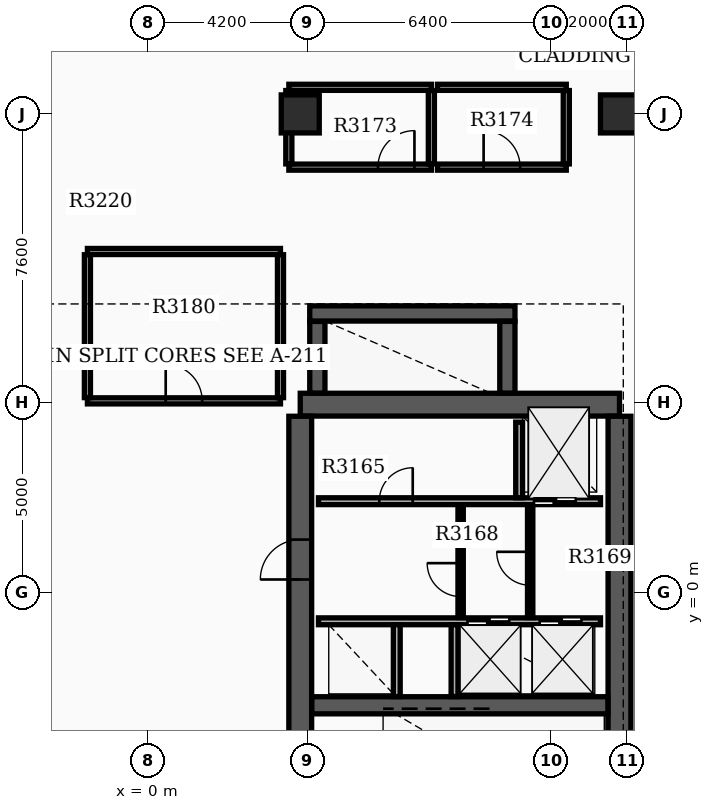
"""IFC4 building model, lengths in metres.
Left out: names, types, materials, properties, quantities, classifications, styles, units other than length and angle.
Written with IfcOpenShell. Run it as: python <this file> out.ifc"""

import sys

from ifc_helpers import new_model, si_unit, direction, frame, frame_2d, origin, origin_2d, place, context, subcontext, project, spatial, rectangle, extrude, element, fill, save


model = new_model("IFC4")
c1 = context("Model", 3, precision=1e-05, world=origin(), true_north=direction((0.0, 1.0)))
c2 = subcontext(c1, "Body", "Model", "MODEL_VIEW")
j1 = project(units=[si_unit("LENGTHUNIT", "METRE"), si_unit("PLANEANGLEUNIT", "RADIAN")], contexts=[c1])
p1 = place(None, origin())
s1 = spatial("IfcSite", under=j1, at=p1, CompositionType="ELEMENT")
p2 = place(p1, origin())
s2 = spatial("IfcBuilding", under=s1, at=p2, CompositionType="ELEMENT")
p3 = place(p2, frame((0.0, 0.0, 201.3)))
s3 = spatial("IfcBuildingStorey", under=s2, at=p3, CompositionType="ELEMENT", Elevation=201.3)
p4 = place(p3, frame((4.0, 4.95, 0.0), z_axis=(0.0, 0.0, 1.0), x_axis=(1.0, 0.0, 0.0)))
e1 = element("IfcWall", 1, at=p4, inside=s3, PredefinedType="SHEAR", context=c2, shape_type="SweptSolid", body=[
    extrude(rectangle(XDim=8.4, YDim=0.6, at=frame_2d((4.2, 0.0))), origin(), (0.0, 0.0, 1.0), 3.7),
])
p5 = place(p3, frame((4.0, -6.545, 0.0), z_axis=(0.0, 0.0, 1.0), x_axis=(0.0, 1.0, 0.0)))
e2 = element("IfcWall", 2, at=p5, inside=s3, PredefinedType="SHEAR", context=c2, shape_type="SweptSolid", body=[
    extrude(rectangle(XDim=11.19, YDim=0.6, at=frame_2d((5.595, 0.0))), origin(), (0.0, 0.0, 1.0), 3.7),
])
p6 = place(p5, frame((1.295, 0.0, 0.0)))
e3 = element("IfcOpeningElement", 3, at=p6, cuts=e2, PredefinedType="OPENING", context=c2, shape_type="SweptSolid", body=[
    extrude(rectangle(XDim=1.05, YDim=2.15, at=frame_2d((0.525, 1.075))), frame((0.0, 0.31, 0.0), z_axis=(0.0, -1.0, 0.0), x_axis=(1.0, 0.0, 0.0)), (0.0, 0.0, 1.0), 0.62),
])
p7 = place(p5, frame((6.895, 0.0, 0.0)))
e4 = element("IfcOpeningElement", 4, at=p7, cuts=e2, PredefinedType="OPENING", context=c2, shape_type="SweptSolid", body=[
    extrude(rectangle(XDim=1.05, YDim=2.15, at=frame_2d((0.525, 1.075))), frame((0.0, 0.31, 0.0), z_axis=(0.0, -1.0, 0.0), x_axis=(1.0, 0.0, 0.0)), (0.0, 0.0, 1.0), 0.62),
])
p8 = place(p3, frame((12.4, -6.545, 0.0), z_axis=(0.0, 0.0, 1.0), x_axis=(0.0, 1.0, 0.0)))
e5 = element("IfcWall", 5, at=p8, inside=s3, PredefinedType="SHEAR", context=c2, shape_type="SweptSolid", body=[
    extrude(rectangle(XDim=11.19, YDim=0.6, at=frame_2d((5.595, 0.0))), origin(), (0.0, 0.0, 1.0), 3.7),
])
p9 = place(p3, frame((4.305, -2.96, 0.0), z_axis=(0.0, 0.0, 1.0), x_axis=(1.0, 0.0, 0.0)))
e6 = element("IfcWall", 6, at=p9, inside=s3, PredefinedType="SHEAR", context=c2, shape_type="SweptSolid", body=[
    extrude(rectangle(XDim=7.79, YDim=0.45, at=frame_2d((3.895, 0.0))), origin(), (0.0, 0.0, 1.0), 3.7),
])
p10 = place(p3, frame((4.45, 5.255, 0.0), z_axis=(0.0, 0.0, 1.0), x_axis=(0.0, 1.0, 0.0)))
e7 = element("IfcWall", 7, at=p10, inside=s3, PredefinedType="SHEAR", context=c2, shape_type="SweptSolid", body=[
    extrude(rectangle(XDim=1.885, YDim=0.4, at=frame_2d((0.942, 0.0))), origin(), (0.0, 0.0, 1.0), 3.7),
])
p11 = place(p3, frame((4.25, 7.35, 0.0), z_axis=(0.0, 0.0, 1.0), x_axis=(1.0, 0.0, 0.0)))
e8 = element("IfcWall", 8, at=p11, inside=s3, PredefinedType="SHEAR", context=c2, shape_type="SweptSolid", body=[
    extrude(rectangle(XDim=5.4, YDim=0.4, at=frame_2d((2.7, 0.0))), origin(), (0.0, 0.0, 1.0), 3.7),
])
p12 = place(p3, frame((9.45, 5.255, 0.0), z_axis=(0.0, 0.0, 1.0), x_axis=(0.0, 1.0, 0.0)))
e9 = element("IfcWall", 9, at=p12, inside=s3, PredefinedType="SHEAR", context=c2, shape_type="SweptSolid", body=[
    extrude(rectangle(XDim=1.885, YDim=0.4, at=frame_2d((0.942, 0.0))), origin(), (0.0, 0.0, 1.0), 3.7),
])
for number, where, z_axis, x_axis in (
    (10, (12.4, 12.6, 0.0), (0.0, 0.0, 1.0), (1.0, 0.0, 0.0)),
    (11, (4.0, 12.6, 0.0), (0.0, 0.0, 1.0), (1.0, 0.0, 0.0)),
):
    element("IfcColumn", number, at=place(p3, frame(where, z_axis=z_axis, x_axis=x_axis)), inside=s3, PredefinedType="COLUMN", context=c2, shape_type="SweptSolid", body=[
        extrude(rectangle(XDim=1.0, YDim=1.0, at=origin_2d()), origin(), (0.0, 0.0, 1.0), 3.9),
    ])
p13 = place(p3, frame((13.796, 14.194, 0.0), z_axis=(0.0, 0.0, 1.0), x_axis=(-0.998023660242, -0.06283926796, 0.0)))
e12 = element("IfcWall", 12, at=p13, inside=s3, PredefinedType="STANDARD", context=c2, shape_type="SweptSolid", body=[
    extrude(rectangle(XDim=1.22, YDim=0.28, at=frame_2d((0.61, 0.0))), origin(), (0.0, 0.0, 1.0), 3.18),
])
p14 = place(p3, frame((4.48, 2.41, 0.0), z_axis=(0.0, 0.0, 1.0), x_axis=(1.0, 0.0, 0.0)))
e13 = element("IfcWall", 13, at=p14, inside=s3, PredefinedType="SOLIDWALL", context=c2, shape_type="SweptSolid", body=[
    extrude(rectangle(XDim=7.42, YDim=0.18, at=frame_2d((3.71, 0.0))), origin(), (0.0, 0.0, 1.0), 3.17),
])
p15 = place(p14, frame((5.67, 0.0, 0.0)))
e14 = element("IfcOpeningElement", 14, at=p15, cuts=e13, PredefinedType="OPENING", context=c2, shape_type="SweptSolid", body=[
    extrude(rectangle(XDim=1.1, YDim=2.15, at=frame_2d((0.55, 1.075))), frame((0.0, 0.1, 0.0), z_axis=(0.0, -1.0, 0.0), x_axis=(1.0, 0.0, 0.0)), (0.0, 0.0, 1.0), 0.2),
])
p16 = place(p14, frame((1.6, 0.0, 0.0)))
e15 = element("IfcOpeningElement", 15, at=p16, cuts=e13, PredefinedType="OPENING", context=c2, shape_type="SweptSolid", body=[
    extrude(rectangle(XDim=0.88, YDim=2.1, at=frame_2d((0.44, 1.05))), frame((0.0, 0.1, 0.0), z_axis=(0.0, -1.0, 0.0), x_axis=(1.0, 0.0, 0.0)), (0.0, 0.0, 1.0), 0.2),
])
p17 = place(p3, frame((4.48, -0.75, 0.0), z_axis=(0.0, 0.0, 1.0), x_axis=(1.0, 0.0, 0.0)))
e16 = element("IfcWall", 16, at=p17, inside=s3, PredefinedType="SOLIDWALL", context=c2, shape_type="SweptSolid", body=[
    extrude(rectangle(XDim=7.42, YDim=0.18, at=frame_2d((3.71, 0.0))), origin(), (0.0, 0.0, 1.0), 3.17),
])
p18 = place(p17, frame((3.92, 0.0, 0.0)))
e17 = element("IfcOpeningElement", 17, at=p18, cuts=e16, PredefinedType="OPENING", context=c2, shape_type="SweptSolid", body=[
    extrude(rectangle(XDim=1.1, YDim=2.15, at=frame_2d((0.55, 1.075))), frame((0.0, 0.1, 0.0), z_axis=(0.0, -1.0, 0.0), x_axis=(1.0, 0.0, 0.0)), (0.0, 0.0, 1.0), 0.2),
])
p19 = place(p17, frame((5.82, 0.0, 0.0)))
e18 = element("IfcOpeningElement", 18, at=p19, cuts=e16, PredefinedType="OPENING", context=c2, shape_type="SweptSolid", body=[
    extrude(rectangle(XDim=1.1, YDim=2.15, at=frame_2d((0.55, 1.075))), frame((0.0, 0.1, 0.0), z_axis=(0.0, -1.0, 0.0), x_axis=(1.0, 0.0, 0.0)), (0.0, 0.0, 1.0), 0.2),
])
p20 = place(p3, frame((9.76, 2.5, 0.0), z_axis=(0.0, 0.0, 1.0), x_axis=(0.0, 1.0, 0.0)))
e19 = element("IfcWall", 19, at=p20, inside=s3, PredefinedType="SOLIDWALL", context=c2, shape_type="SweptSolid", body=[
    extrude(rectangle(XDim=1.99, YDim=0.18, at=frame_2d((0.995, 0.0))), origin(), (0.0, 0.0, 1.0), 3.17),
])
for number, where, z_axis, x_axis in (
    (20, (6.54, -2.73, 0.0), (0.0, 0.0, 1.0), (0.0, 1.0, 0.0)),
    (21, (8.06, -2.73, 0.0), (0.0, 0.0, 1.0), (0.0, 1.0, 0.0)),
):
    element("IfcWall", number, at=place(p3, frame(where, z_axis=z_axis, x_axis=x_axis)), inside=s3, PredefinedType="SOLIDWALL", context=c2, shape_type="SweptSolid", body=[
        extrude(rectangle(XDim=1.89, YDim=0.18, at=frame_2d((0.945, 0.0))), origin(), (0.0, 0.0, 1.0), 3.17),
    ])
p21 = place(p3, frame((8.22, -0.65, 0.0), z_axis=(0.0, 0.0, 1.0), x_axis=(0.0, 1.0, 0.0)))
e22 = element("IfcWall", 22, at=p21, inside=s3, PredefinedType="SOLIDWALL", context=c2, shape_type="SweptSolid", body=[
    extrude(rectangle(XDim=2.96, YDim=0.14, at=frame_2d((1.48, 0.0))), origin(), (0.0, 0.0, 1.0), 3.17),
])
p22 = place(p21, frame((0.55, 0.0, 0.0)))
e23 = element("IfcOpeningElement", 23, at=p22, cuts=e22, PredefinedType="OPENING", context=c2, shape_type="SweptSolid", body=[
    extrude(rectangle(XDim=0.88, YDim=2.1, at=frame_2d((0.44, 1.05))), frame((0.0, 0.08, 0.0), z_axis=(0.0, -1.0, 0.0), x_axis=(1.0, 0.0, 0.0)), (0.0, 0.0, 1.0), 0.16),
])
p23 = place(p3, frame((10.05, -0.652, 0.0), z_axis=(0.0, 0.0, 1.0), x_axis=(0.0, 1.0, 0.0)))
e24 = element("IfcWall", 24, at=p23, inside=s3, PredefinedType="PARTITIONING", context=c2, shape_type="SweptSolid", body=[
    extrude(rectangle(XDim=2.962, YDim=0.14, at=frame_2d((1.481, 0.0))), origin(), (0.0, 0.0, 1.0), 3.17),
])
p24 = place(p23, frame((0.85, 0.0, 0.0)))
e25 = element("IfcOpeningElement", 25, at=p24, cuts=e24, PredefinedType="OPENING", context=c2, shape_type="SweptSolid", body=[
    extrude(rectangle(XDim=0.88, YDim=2.1, at=frame_2d((0.44, 1.05))), frame((0.0, 0.08, 0.0), z_axis=(0.0, -1.0, 0.0), x_axis=(1.0, 0.0, 0.0)), (0.0, 0.0, 1.0), 0.16),
])
p25 = place(p3, frame((3.7, 11.2, 0.0), z_axis=(0.0, 0.0, 1.0), x_axis=(1.0, 0.0, 0.0)))
e26 = element("IfcWall", 26, at=p25, inside=s3, PredefinedType="PARTITIONING", context=c2, shape_type="SweptSolid", body=[
    extrude(rectangle(XDim=3.75, YDim=0.16, at=frame_2d((1.875, 0.0))), origin(), (0.0, 0.0, 1.0), 3.17),
])
p26 = place(p25, frame((2.345, 0.0, 0.0)))
e27 = element("IfcOpeningElement", 27, at=p26, cuts=e26, PredefinedType="OPENING", context=c2, shape_type="SweptSolid", body=[
    extrude(rectangle(XDim=0.96, YDim=2.15, at=frame_2d((0.48, 1.075))), frame((0.0, 0.09, 0.0), z_axis=(0.0, -1.0, 0.0), x_axis=(1.0, 0.0, 0.0)), (0.0, 0.0, 1.0), 0.18),
])
p27 = place(p3, frame((3.7, 13.3, 0.0), z_axis=(0.0, 0.0, 1.0), x_axis=(1.0, 0.0, 0.0)))
e28 = element("IfcWall", 28, at=p27, inside=s3, PredefinedType="PARTITIONING", context=c2, shape_type="SweptSolid", body=[
    extrude(rectangle(XDim=3.75, YDim=0.16, at=frame_2d((1.875, 0.0))), origin(), (0.0, 0.0, 1.0), 3.17),
])
for number, where, z_axis, x_axis in (
    (29, (3.7, 11.285, 0.0), (0.0, 0.0, 1.0), (0.0, 1.0, 0.0)),
    (30, (7.45, 11.285, 0.0), (0.0, 0.0, 1.0), (0.0, 1.0, 0.0)),
):
    element("IfcWall", number, at=place(p3, frame(where, z_axis=z_axis, x_axis=x_axis)), inside=s3, PredefinedType="PARTITIONING", context=c2, shape_type="SweptSolid", body=[
        extrude(rectangle(XDim=1.93, YDim=0.16, at=frame_2d((0.965, 0.0))), origin(), (0.0, 0.0, 1.0), 3.17),
    ])
p28 = place(p3, frame((7.61, 11.2, 0.0), z_axis=(0.0, 0.0, 1.0), x_axis=(1.0, 0.0, 0.0)))
e31 = element("IfcWall", 31, at=p28, inside=s3, PredefinedType="PARTITIONING", context=c2, shape_type="SweptSolid", body=[
    extrude(rectangle(XDim=3.39, YDim=0.16, at=frame_2d((1.695, 0.0))), origin(), (0.0, 0.0, 1.0), 3.17),
])
p29 = place(p28, frame((1.215, 0.0, 0.0)))
e32 = element("IfcOpeningElement", 32, at=p29, cuts=e31, PredefinedType="OPENING", context=c2, shape_type="SweptSolid", body=[
    extrude(rectangle(XDim=0.96, YDim=2.15, at=frame_2d((0.48, 1.075))), frame((0.0, 0.09, 0.0), z_axis=(0.0, -1.0, 0.0), x_axis=(1.0, 0.0, 0.0)), (0.0, 0.0, 1.0), 0.18),
])
p30 = place(p3, frame((7.61, 13.3, 0.0), z_axis=(0.0, 0.0, 1.0), x_axis=(1.0, 0.0, 0.0)))
e33 = element("IfcWall", 33, at=p30, inside=s3, PredefinedType="PARTITIONING", context=c2, shape_type="SweptSolid", body=[
    extrude(rectangle(XDim=3.39, YDim=0.16, at=frame_2d((1.695, 0.0))), origin(), (0.0, 0.0, 1.0), 3.17),
])
p31 = place(p3, frame((11.0, 11.285, 0.0), z_axis=(0.0, 0.0, 1.0), x_axis=(0.0, 1.0, 0.0)))
e34 = element("IfcWall", 34, at=p31, inside=s3, PredefinedType="PARTITIONING", context=c2, shape_type="SweptSolid", body=[
    extrude(rectangle(XDim=1.93, YDim=0.16, at=frame_2d((0.965, 0.0))), origin(), (0.0, 0.0, 1.0), 3.17),
])
p32 = place(p3, frame((-1.6, 5.05, 0.0), z_axis=(0.0, 0.0, 1.0), x_axis=(1.0, 0.0, 0.0)))
e35 = element("IfcWall", 35, at=p32, inside=s3, PredefinedType="PARTITIONING", context=c2, shape_type="SweptSolid", body=[
    extrude(rectangle(XDim=5.08, YDim=0.16, at=frame_2d((2.54, 0.0))), origin(), (0.0, 0.0, 1.0), 3.17),
])
p33 = place(p32, frame((2.06, 0.0, 0.0)))
e36 = element("IfcOpeningElement", 36, at=p33, cuts=e35, PredefinedType="OPENING", context=c2, shape_type="SweptSolid", body=[
    extrude(rectangle(XDim=0.96, YDim=2.15, at=frame_2d((0.48, 1.075))), frame((0.0, 0.09, 0.0), z_axis=(0.0, -1.0, 0.0), x_axis=(1.0, 0.0, 0.0)), (0.0, 0.0, 1.0), 0.18),
])
p34 = place(p3, frame((-1.6, 8.98, 0.0), z_axis=(0.0, 0.0, 1.0), x_axis=(1.0, 0.0, 0.0)))
e37 = element("IfcWall", 37, at=p34, inside=s3, PredefinedType="PARTITIONING", context=c2, shape_type="SweptSolid", body=[
    extrude(rectangle(XDim=5.08, YDim=0.16, at=frame_2d((2.54, 0.0))), origin(), (0.0, 0.0, 1.0), 3.17),
])
for number, where, z_axis, x_axis in (
    (38, (-1.6, 5.135, 0.0), (0.0, 0.0, 1.0), (0.0, 1.0, 0.0)),
    (39, (3.48, 5.135, 0.0), (0.0, 0.0, 1.0), (0.0, 1.0, 0.0)),
):
    element("IfcWall", number, at=place(p3, frame(where, z_axis=z_axis, x_axis=x_axis)), inside=s3, PredefinedType="PARTITIONING", context=c2, shape_type="SweptSolid", body=[
        extrude(rectangle(XDim=3.76, YDim=0.16, at=frame_2d((1.88, 0.0))), origin(), (0.0, 0.0, 1.0), 3.17),
    ])
p35 = place(p7, origin())
e40 = element("IfcDoor", 40, at=p35, inside=s3, OperationType="SINGLE_SWING_LEFT", PredefinedType="DOOR", context=c2, shape_type="SweptSolid", body=[
    extrude(rectangle(XDim=1.05, YDim=2.15, at=frame_2d((0.525, 1.075))), frame((0.0, 0.025, 0.0), z_axis=(0.0, -1.0, 0.0), x_axis=(1.0, 0.0, 0.0)), (0.0, 0.0, 1.0), 0.05),
])
fill(e4, e40)
p36 = place(p15, origin())
e41 = element("IfcDoor", 41, at=p36, inside=s3, OperationType="DOUBLE_DOOR_SLIDING", PredefinedType="DOOR", context=c2, shape_type="SweptSolid", body=[
    extrude(rectangle(XDim=1.1, YDim=2.15, at=frame_2d((0.55, 1.075))), frame((0.0, 0.025, 0.0), z_axis=(0.0, -1.0, 0.0), x_axis=(1.0, 0.0, 0.0)), (0.0, 0.0, 1.0), 0.05),
])
fill(e14, e41)
p37 = place(p18, origin())
e42 = element("IfcDoor", 42, at=p37, inside=s3, OperationType="DOUBLE_DOOR_SLIDING", PredefinedType="DOOR", context=c2, shape_type="SweptSolid", body=[
    extrude(rectangle(XDim=1.1, YDim=2.15, at=frame_2d((0.55, 1.075))), frame((0.0, 0.025, 0.0), z_axis=(0.0, -1.0, 0.0), x_axis=(1.0, 0.0, 0.0)), (0.0, 0.0, 1.0), 0.05),
])
fill(e17, e42)
p38 = place(p19, origin())
e43 = element("IfcDoor", 43, at=p38, inside=s3, OperationType="DOUBLE_DOOR_SLIDING", PredefinedType="DOOR", context=c2, shape_type="SweptSolid", body=[
    extrude(rectangle(XDim=1.1, YDim=2.15, at=frame_2d((0.55, 1.075))), frame((0.0, 0.025, 0.0), z_axis=(0.0, -1.0, 0.0), x_axis=(1.0, 0.0, 0.0)), (0.0, 0.0, 1.0), 0.05),
])
fill(e18, e43)
p39 = place(p16, origin())
e44 = element("IfcDoor", 44, at=p39, inside=s3, OperationType="SINGLE_SWING_RIGHT", PredefinedType="DOOR", context=c2, shape_type="SweptSolid", body=[
    extrude(rectangle(XDim=0.88, YDim=2.1, at=frame_2d((0.44, 1.05))), frame((0.0, 0.025, 0.0), z_axis=(0.0, -1.0, 0.0), x_axis=(1.0, 0.0, 0.0)), (0.0, 0.0, 1.0), 0.05),
])
fill(e15, e44)
p40 = place(p22, origin())
e45 = element("IfcDoor", 45, at=p40, inside=s3, OperationType="SINGLE_SWING_RIGHT", PredefinedType="DOOR", context=c2, shape_type="SweptSolid", body=[
    extrude(rectangle(XDim=0.88, YDim=2.1, at=frame_2d((0.44, 1.05))), frame((0.0, 0.025, 0.0), z_axis=(0.0, -1.0, 0.0), x_axis=(1.0, 0.0, 0.0)), (0.0, 0.0, 1.0), 0.05),
])
fill(e23, e45)
p41 = place(p24, origin())
e46 = element("IfcDoor", 46, at=p41, inside=s3, OperationType="SINGLE_SWING_RIGHT", PredefinedType="DOOR", context=c2, shape_type="SweptSolid", body=[
    extrude(rectangle(XDim=0.88, YDim=2.1, at=frame_2d((0.44, 1.05))), frame((0.0, 0.025, 0.0), z_axis=(0.0, -1.0, 0.0), x_axis=(1.0, 0.0, 0.0)), (0.0, 0.0, 1.0), 0.05),
])
fill(e25, e46)
p42 = place(p26, origin())
e47 = element("IfcDoor", 47, at=p42, inside=s3, OperationType="SINGLE_SWING_RIGHT", PredefinedType="DOOR", context=c2, shape_type="SweptSolid", body=[
    extrude(rectangle(XDim=0.96, YDim=2.15, at=frame_2d((0.48, 1.075))), frame((0.0, 0.025, 0.0), z_axis=(0.0, -1.0, 0.0), x_axis=(1.0, 0.0, 0.0)), (0.0, 0.0, 1.0), 0.05),
])
fill(e27, e47)
p43 = place(p29, origin())
e48 = element("IfcDoor", 48, at=p43, inside=s3, OperationType="SINGLE_SWING_LEFT", PredefinedType="DOOR", context=c2, shape_type="SweptSolid", body=[
    extrude(rectangle(XDim=0.96, YDim=2.15, at=frame_2d((0.48, 1.075))), frame((0.0, 0.025, 0.0), z_axis=(0.0, -1.0, 0.0), x_axis=(1.0, 0.0, 0.0)), (0.0, 0.0, 1.0), 0.05),
])
fill(e32, e48)
p44 = place(p33, origin())
e49 = element("IfcDoor", 49, at=p44, inside=s3, OperationType="SINGLE_SWING_LEFT", PredefinedType="DOOR", context=c2, shape_type="SweptSolid", body=[
    extrude(rectangle(XDim=0.96, YDim=2.15, at=frame_2d((0.48, 1.075))), frame((0.0, 0.025, 0.0), z_axis=(0.0, -1.0, 0.0), x_axis=(1.0, 0.0, 0.0)), (0.0, 0.0, 1.0), 0.05),
])
fill(e36, e49)
save(model, sys.argv[1])
